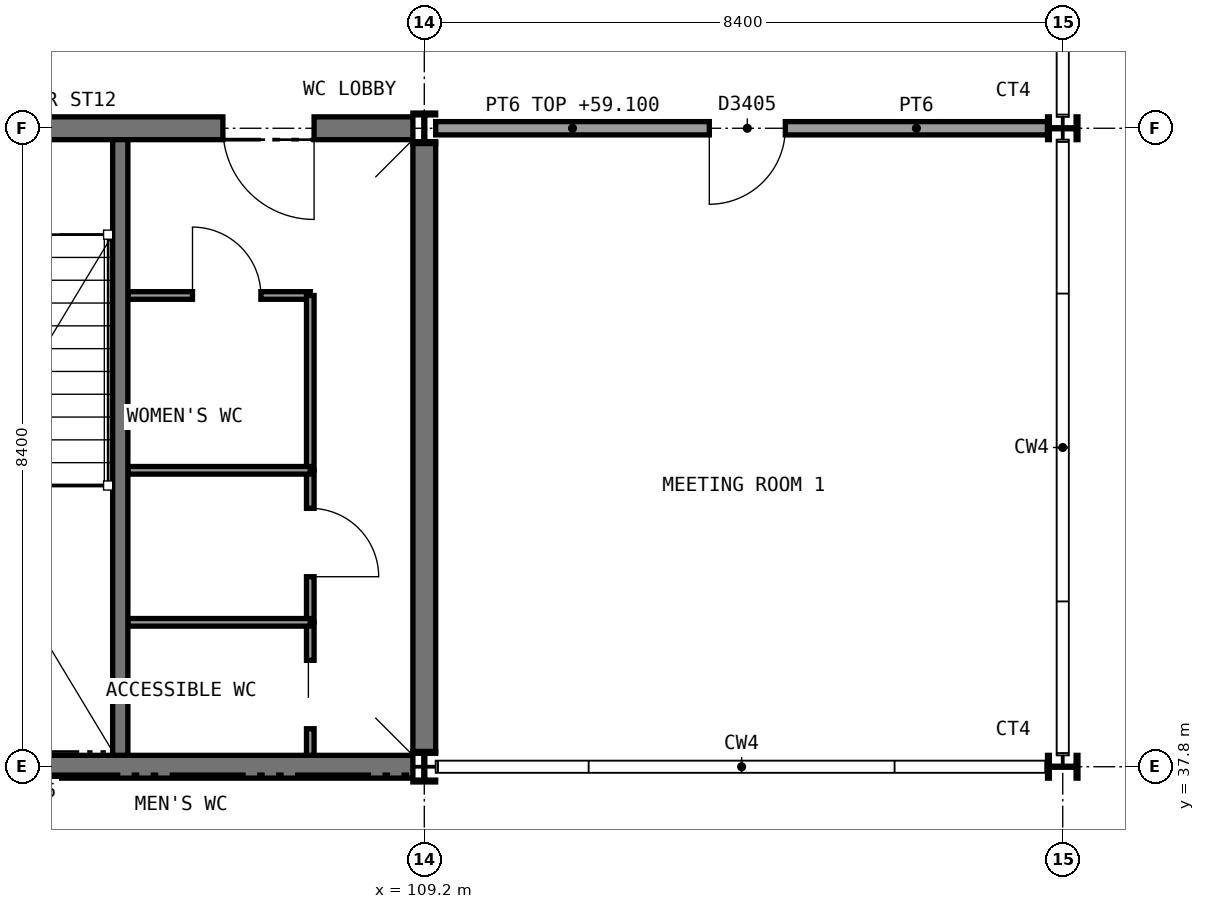
"""IFC4 building model, lengths in metres.
Left out: names, types, materials, properties, quantities, classifications, styles, units other than length and angle.
Written with IfcOpenShell. Run it as: python <this file> out.ifc"""

import sys

from ifc_helpers import new_model, si_unit, direction, frame, frame_2d, origin, origin_2d, place, context, subcontext, project, spatial, rectangle, i_section, extrude, element, fill, save


model = new_model("IFC4")
c1 = context("Model", 3, precision=1e-05, world=origin(), true_north=direction((0.0, 1.0)))
c2 = subcontext(c1, "Body", "Model", "MODEL_VIEW")
j1 = project(units=[si_unit("LENGTHUNIT", "METRE"), si_unit("PLANEANGLEUNIT", "RADIAN")], contexts=[c1])
p1 = place(None, origin())
s1 = spatial("IfcSite", under=j1, at=p1, CompositionType="ELEMENT")
p2 = place(p1, origin())
s2 = spatial("IfcBuilding", under=s1, at=p2, CompositionType="ELEMENT")
p3 = place(p2, frame((0.0, 0.0, 55.6)))
s3 = spatial("IfcBuildingStorey", under=s2, at=p3, CompositionType="ELEMENT", Elevation=55.6)
p4 = place(p3, frame((100.95, 37.8, 0.0), z_axis=(0.0, 0.0, 1.0), x_axis=(1.0, 0.0, 0.0)))
e1 = element("IfcWall", 1, at=p4, inside=s3, PredefinedType="SHEAR", context=c2, shape_type="SweptSolid", body=[
    extrude(rectangle(XDim=8.1, YDim=0.3, at=frame_2d((4.05, 0.0))), origin(), (0.0, 0.0, 1.0), 3.85),
])
p5 = place(p3, frame((100.95, 46.2, 0.0), z_axis=(0.0, 0.0, 1.0), x_axis=(1.0, 0.0, 0.0)))
e2 = element("IfcWall", 2, at=p5, inside=s3, PredefinedType="SHEAR", context=c2, shape_type="SweptSolid", body=[
    extrude(rectangle(XDim=8.1, YDim=0.3, at=frame_2d((4.05, 0.0))), origin(), (0.0, 0.0, 1.0), 3.85),
])
p6 = place(p5, frame((1.15, 0.0, 0.0)))
e3 = element("IfcOpeningElement", 3, at=p6, cuts=e2, PredefinedType="OPENING", context=c2, shape_type="SweptSolid", body=[
    extrude(rectangle(XDim=1.8, YDim=2.1, at=frame_2d((0.9, 1.05))), frame((0.0, 0.16, 0.0), z_axis=(0.0, -1.0, 0.0), x_axis=(1.0, 0.0, 0.0)), (0.0, 0.0, 1.0), 0.32),
])
p7 = place(p5, frame((5.6, 0.0, 0.0)))
e4 = element("IfcOpeningElement", 4, at=p7, cuts=e2, PredefinedType="OPENING", context=c2, shape_type="SweptSolid", body=[
    extrude(rectangle(XDim=1.2, YDim=2.1, at=frame_2d((0.6, 1.05))), frame((0.0, 0.16, 0.0), z_axis=(0.0, -1.0, 0.0), x_axis=(1.0, 0.0, 0.0)), (0.0, 0.0, 1.0), 0.32),
])
p8 = place(p3, frame((109.2, 38.0, 0.0), z_axis=(0.0, 0.0, 1.0), x_axis=(0.0, 1.0, 0.0)))
e5 = element("IfcWall", 5, at=p8, inside=s3, PredefinedType="SHEAR", context=c2, shape_type="SweptSolid", body=[
    extrude(rectangle(XDim=8.0, YDim=0.3, at=frame_2d((4.0, 0.0))), origin(), (0.0, 0.0, 1.0), 3.85),
])
for number, where, z_axis, x_axis in (
    (6, (109.2, 37.8, 0.0), (0.0, 0.0, 1.0), (1.0, 0.0, 0.0)),
    (7, (109.2, 46.2, 0.0), (0.0, 0.0, 1.0), (1.0, 0.0, 0.0)),
    (8, (117.6, 37.8, 0.0), (0.0, 0.0, 1.0), (0.0, 1.0, 0.0)),
    (9, (117.6, 46.2, 0.0), (0.0, 0.0, 1.0), (0.0, 1.0, 0.0)),
):
    element("IfcColumn", number, at=place(p3, frame(where, z_axis=z_axis, x_axis=x_axis)), inside=s3, PredefinedType="COLUMN", context=c2, shape_type="SweptSolid", body=[
        extrude(i_section(OverallWidth=0.3, OverallDepth=0.4, WebThickness=0.013, FlangeThickness=0.024, FilletRadius=0.027, at=origin_2d()), origin(), (0.0, 0.0, 1.0), 4.0),
    ])
p9 = place(p3, frame((105.3, 44.0, 0.0), z_axis=(0.0, 0.0, 1.0), x_axis=(1.0, 0.0, 0.0)))
e10 = element("IfcWall", 10, at=p9, inside=s3, PredefinedType="PARTITIONING", context=c2, shape_type="SweptSolid", body=[
    extrude(rectangle(XDim=2.4, YDim=0.1, at=frame_2d((1.2, 0.0))), origin(), (0.0, 0.0, 1.0), 3.78),
])
p10 = place(p9, frame((0.85, 0.0, 0.0)))
e11 = element("IfcOpeningElement", 11, at=p10, cuts=e10, PredefinedType="OPENING", context=c2, shape_type="SweptSolid", body=[
    extrude(rectangle(XDim=0.9, YDim=2.1, at=frame_2d((0.45, 1.05))), frame((0.0, 0.06, 0.0), z_axis=(0.0, -1.0, 0.0), x_axis=(1.0, 0.0, 0.0)), (0.0, 0.0, 1.0), 0.12),
])
p11 = place(p3, frame((107.7, 41.7, 0.0), z_axis=(0.0, 0.0, 1.0), x_axis=(0.0, 1.0, 0.0)))
e12 = element("IfcWall", 12, at=p11, inside=s3, PredefinedType="PARTITIONING", context=c2, shape_type="SweptSolid", body=[
    extrude(rectangle(XDim=2.3, YDim=0.1, at=frame_2d((1.15, 0.0))), origin(), (0.0, 0.0, 1.0), 3.78),
])
p12 = place(p3, frame((107.7, 39.7, 0.0), z_axis=(0.0, 0.0, 1.0), x_axis=(0.0, 1.0, 0.0)))
e13 = element("IfcWall", 13, at=p12, inside=s3, PredefinedType="PARTITIONING", context=c2, shape_type="SweptSolid", body=[
    extrude(rectangle(XDim=2.0, YDim=0.1, at=frame_2d((1.0, 0.0))), origin(), (0.0, 0.0, 1.0), 3.78),
])
p13 = place(p12, frame((0.6, 0.0, 0.0)))
e14 = element("IfcOpeningElement", 14, at=p13, cuts=e13, PredefinedType="OPENING", context=c2, shape_type="SweptSolid", body=[
    extrude(rectangle(XDim=0.9, YDim=2.1, at=frame_2d((0.45, 1.05))), frame((0.0, 0.06, 0.0), z_axis=(0.0, -1.0, 0.0), x_axis=(1.0, 0.0, 0.0)), (0.0, 0.0, 1.0), 0.12),
])
p14 = place(p3, frame((107.7, 37.95, 0.0), z_axis=(0.0, 0.0, 1.0), x_axis=(0.0, 1.0, 0.0)))
e15 = element("IfcWall", 15, at=p14, inside=s3, PredefinedType="PARTITIONING", context=c2, shape_type="SweptSolid", body=[
    extrude(rectangle(XDim=1.75, YDim=0.1, at=frame_2d((0.875, 0.0))), origin(), (0.0, 0.0, 1.0), 3.78),
])
p15 = place(p14, frame((0.35, 0.0, 0.0)))
e16 = element("IfcOpeningElement", 16, at=p15, cuts=e15, PredefinedType="OPENING", context=c2, shape_type="SweptSolid", body=[
    extrude(rectangle(XDim=0.9, YDim=2.1, at=frame_2d((0.45, 1.05))), frame((0.0, 0.06, 0.0), z_axis=(0.0, -1.0, 0.0), x_axis=(1.0, 0.0, 0.0)), (0.0, 0.0, 1.0), 0.12),
])
for number, where, z_axis, x_axis in (
    (17, (105.3, 41.7, 0.0), (0.0, 0.0, 1.0), (1.0, 0.0, 0.0)),
    (18, (105.3, 39.7, 0.0), (0.0, 0.0, 1.0), (1.0, 0.0, 0.0)),
):
    element("IfcWall", number, at=place(p3, frame(where, z_axis=z_axis, x_axis=x_axis)), inside=s3, PredefinedType="PARTITIONING", context=c2, shape_type="SweptSolid", body=[
        extrude(rectangle(XDim=2.4, YDim=0.1, at=frame_2d((1.2, 0.0))), origin(), (0.0, 0.0, 1.0), 3.78),
    ])
p16 = place(p3, frame((109.35, 46.2, 0.0), z_axis=(0.0, 0.0, 1.0), x_axis=(1.0, 0.0, 0.0)))
e19 = element("IfcWall", 19, at=p16, inside=s3, PredefinedType="PARTITIONING", context=c2, shape_type="SweptSolid", body=[
    extrude(rectangle(XDim=8.05, YDim=0.175, at=frame_2d((4.025, 0.0))), origin(), (0.0, 0.0, 1.0), 3.5),
])
p17 = place(p16, frame((3.6, 0.0, 0.0)))
e20 = element("IfcOpeningElement", 20, at=p17, cuts=e19, PredefinedType="OPENING", context=c2, shape_type="SweptSolid", body=[
    extrude(rectangle(XDim=1.0, YDim=2.1, at=frame_2d((0.5, 1.05))), frame((0.0, 0.098, 0.0), z_axis=(0.0, -1.0, 0.0), x_axis=(1.0, 0.0, 0.0)), (0.0, 0.0, 1.0), 0.195),
])
p18 = place(p3, frame((105.2, 37.95, 0.0), z_axis=(0.0, 0.0, 1.0), x_axis=(0.0, 1.0, 0.0)))
e21 = element("IfcWall", 21, at=p18, inside=s3, PredefinedType="SHEAR", context=c2, shape_type="SweptSolid", body=[
    extrude(rectangle(XDim=8.1, YDim=0.2, at=frame_2d((4.05, 0.0))), origin(), (0.0, 0.0, 1.0), 3.85),
])
p19 = place(p10, origin())
e22 = element("IfcDoor", 22, at=p19, inside=s3, OperationType="SINGLE_SWING_LEFT", PredefinedType="DOOR", context=c2, shape_type="SweptSolid", body=[
    extrude(rectangle(XDim=0.9, YDim=2.1, at=frame_2d((0.45, 1.05))), frame((0.0, 0.025, 0.0), z_axis=(0.0, -1.0, 0.0), x_axis=(1.0, 0.0, 0.0)), (0.0, 0.0, 1.0), 0.05),
])
fill(e11, e22)
p20 = place(p13, frame((0.9, 0.0, 0.0), z_axis=(0.0, 0.0, 1.0), x_axis=(-1.0, 0.0, 0.0)))
e23 = element("IfcDoor", 23, at=p20, inside=s3, OperationType="SINGLE_SWING_RIGHT", PredefinedType="DOOR", context=c2, shape_type="SweptSolid", body=[
    extrude(rectangle(XDim=0.9, YDim=2.1, at=frame_2d((0.45, 1.05))), frame((0.0, 0.025, 0.0), z_axis=(0.0, -1.0, 0.0), x_axis=(1.0, 0.0, 0.0)), (0.0, 0.0, 1.0), 0.05),
])
fill(e14, e23)
p21 = place(p15, origin())
e24 = element("IfcDoor", 24, at=p21, inside=s3, OperationType="SLIDING_TO_RIGHT", PredefinedType="DOOR", context=c2, shape_type="SweptSolid", body=[
    extrude(rectangle(XDim=0.9, YDim=2.1, at=frame_2d((0.45, 1.05))), frame((0.0, 0.025, 0.0), z_axis=(0.0, -1.0, 0.0), x_axis=(1.0, 0.0, 0.0)), (0.0, 0.0, 1.0), 0.05),
])
fill(e16, e24)
p22 = place(p17, frame((1.0, 0.0, 0.0), z_axis=(0.0, 0.0, 1.0), x_axis=(-1.0, 0.0, 0.0)))
e25 = element("IfcDoor", 25, at=p22, inside=s3, OperationType="SINGLE_SWING_RIGHT", PredefinedType="DOOR", context=c2, shape_type="SweptSolid", body=[
    extrude(rectangle(XDim=1.0, YDim=2.1, at=frame_2d((0.5, 1.05))), frame((0.0, 0.025, 0.0), z_axis=(0.0, -1.0, 0.0), x_axis=(1.0, 0.0, 0.0)), (0.0, 0.0, 1.0), 0.05),
])
fill(e20, e25)
p23 = place(p7, frame((1.2, 0.0, 0.0), z_axis=(0.0, 0.0, 1.0), x_axis=(-1.0, 0.0, 0.0)))
e26 = element("IfcDoor", 26, at=p23, inside=s3, OperationType="SINGLE_SWING_LEFT", PredefinedType="DOOR", context=c2, shape_type="SweptSolid", body=[
    extrude(rectangle(XDim=1.2, YDim=2.1, at=frame_2d((0.6, 1.05))), frame((0.0, 0.025, 0.0), z_axis=(0.0, -1.0, 0.0), x_axis=(1.0, 0.0, 0.0)), (0.0, 0.0, 1.0), 0.05),
])
fill(e4, e26)
save(model, sys.argv[1])
